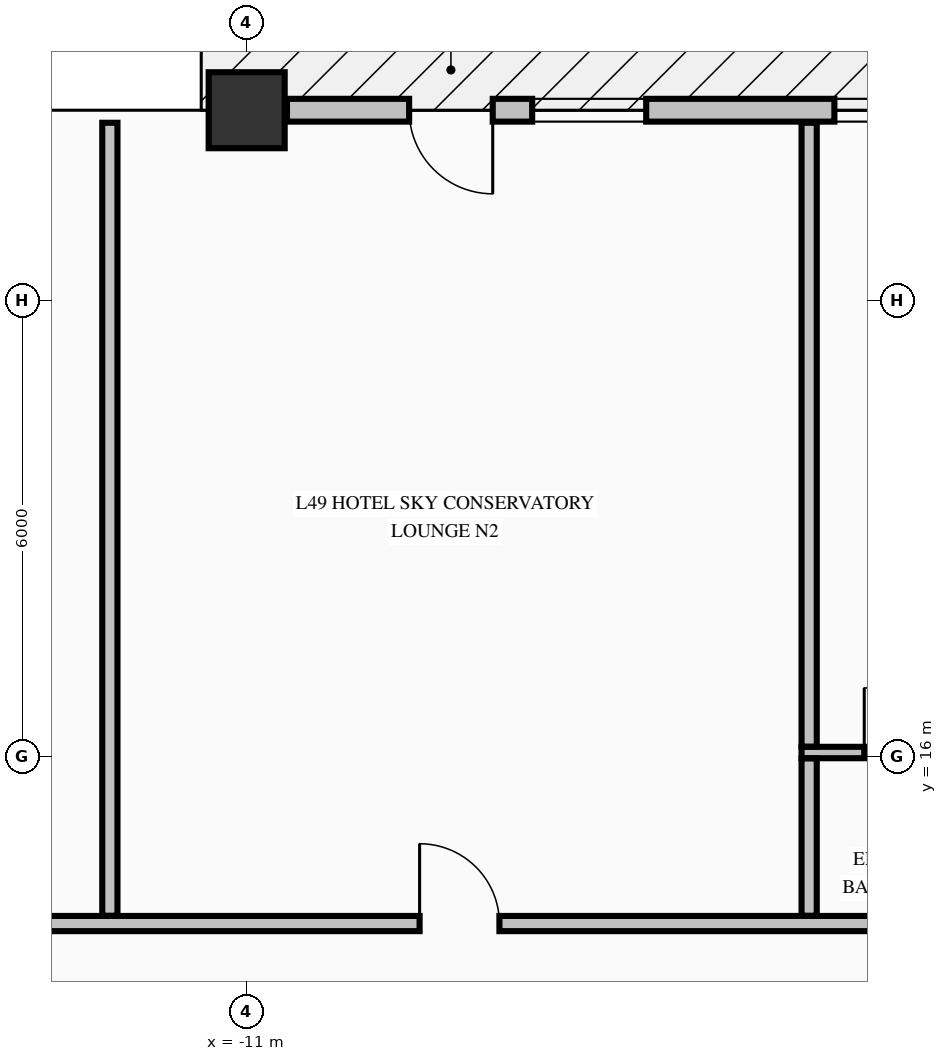
"""IFC4 building model, lengths in metres.
Left out: names, types, materials, properties, quantities, classifications, styles, units other than length and angle.
Written with IfcOpenShell. Run it as: python <this file> out.ifc"""

import sys

from ifc_helpers import new_model, si_unit, direction, frame, frame_2d, origin, origin_2d, place, context, subcontext, project, spatial, rectangle, extrude, element, fill, save


model = new_model("IFC4")
c1 = context("Model", 3, precision=1e-05, world=origin(), true_north=direction((0.0, 1.0)))
c2 = subcontext(c1, "Body", "Model", "MODEL_VIEW")
j1 = project(units=[si_unit("LENGTHUNIT", "METRE"), si_unit("PLANEANGLEUNIT", "RADIAN")], contexts=[c1])
p1 = place(None, origin())
s1 = spatial("IfcSite", under=j1, at=p1, CompositionType="ELEMENT")
p2 = place(p1, origin())
s2 = spatial("IfcBuilding", under=s1, at=p2, CompositionType="ELEMENT")
p3 = place(p2, frame((0.0, 0.0, 191.46)))
s3 = spatial("IfcBuildingStorey", under=s2, at=p3, CompositionType="ELEMENT", Elevation=191.46)
p4 = place(p3, frame((-11.0, 24.5, -0.425), z_axis=(0.0, 0.0, 1.0), x_axis=(1.0, 0.0, 0.0)))
e1 = element("IfcColumn", 1, at=p4, inside=s3, PredefinedType="COLUMN", context=c2, shape_type="SweptSolid", body=[
    extrude(rectangle(XDim=1.0, YDim=1.0, at=origin_2d()), origin(), (0.0, 0.0, 1.0), 3.55),
])
p5 = place(p3, frame((-0.53, 24.5, 0.0), z_axis=(0.0, 0.0, 1.0), x_axis=(-1.0, 0.0, 0.0)))
e2 = element("IfcWall", 2, at=p5, inside=s3, PredefinedType="STANDARD", context=c2, shape_type="SweptSolid", body=[
    extrude(rectangle(XDim=9.94, YDim=0.3, at=frame_2d((4.97, 0.0))), origin(), (0.0, 0.0, 1.0), 2.517),
])
p6 = place(p5, frame((7.233, 0.0, 0.0)))
e3 = element("IfcOpeningElement", 3, at=p6, cuts=e2, PredefinedType="OPENING", context=c2, shape_type="SweptSolid", body=[
    extrude(rectangle(XDim=1.1, YDim=2.15, at=frame_2d((0.55, 1.075))), frame((0.0, 0.16, 0.0), z_axis=(0.0, -1.0, 0.0), x_axis=(1.0, 0.0, 0.0)), (0.0, 0.0, 1.0), 0.32),
])
p7 = place(p5, frame((1.238, 0.0, 0.72)))
e4 = element("IfcOpeningElement", 4, at=p7, cuts=e2, PredefinedType="OPENING", context=c2, shape_type="SweptSolid", body=[
    extrude(rectangle(XDim=1.5, YDim=1.6, at=frame_2d((0.75, 0.8))), frame((0.0, 0.16, 0.0), z_axis=(0.0, -1.0, 0.0), x_axis=(1.0, 0.0, 0.0)), (0.0, 0.0, 1.0), 0.32),
])
p8 = place(p5, frame((5.214, 0.0, 0.72)))
e5 = element("IfcOpeningElement", 5, at=p8, cuts=e2, PredefinedType="OPENING", context=c2, shape_type="SweptSolid", body=[
    extrude(rectangle(XDim=1.5, YDim=1.6, at=frame_2d((0.75, 0.8))), frame((0.0, 0.16, 0.0), z_axis=(0.0, -1.0, 0.0), x_axis=(1.0, 0.0, 0.0)), (0.0, 0.0, 1.0), 0.32),
])
p9 = place(p3, frame((-22.1, 13.8, 0.0), z_axis=(0.0, 0.0, 1.0), x_axis=(1.0, 0.0, 0.0)))
e6 = element("IfcWall", 6, at=p9, inside=s3, PredefinedType="PARTITIONING", context=c2, shape_type="SweptSolid", body=[
    extrude(rectangle(XDim=39.2, YDim=0.2, at=frame_2d((19.6, 0.0))), origin(), (0.0, 0.0, 1.0), 3.125),
])
p10 = place(p9, frame((5.375, 0.0, 0.0)))
e7 = element("IfcOpeningElement", 7, at=p10, cuts=e6, PredefinedType="OPENING", context=c2, shape_type="SweptSolid", body=[
    extrude(rectangle(XDim=0.95, YDim=2.15, at=frame_2d((0.475, 1.075))), frame((0.0, 0.11, 0.0), z_axis=(0.0, -1.0, 0.0), x_axis=(1.0, 0.0, 0.0)), (0.0, 0.0, 1.0), 0.22),
])
p11 = place(p9, frame((13.375, 0.0, 0.0)))
e8 = element("IfcOpeningElement", 8, at=p11, cuts=e6, PredefinedType="OPENING", context=c2, shape_type="SweptSolid", body=[
    extrude(rectangle(XDim=1.05, YDim=2.15, at=frame_2d((0.525, 1.075))), frame((0.0, 0.11, 0.0), z_axis=(0.0, -1.0, 0.0), x_axis=(1.0, 0.0, 0.0)), (0.0, 0.0, 1.0), 0.22),
])
p12 = place(p9, frame((23.875, 0.0, 0.0)))
e9 = element("IfcOpeningElement", 9, at=p12, cuts=e6, PredefinedType="OPENING", context=c2, shape_type="SweptSolid", body=[
    extrude(rectangle(XDim=0.95, YDim=2.15, at=frame_2d((0.475, 1.075))), frame((0.0, 0.11, 0.0), z_axis=(0.0, -1.0, 0.0), x_axis=(1.0, 0.0, 0.0)), (0.0, 0.0, 1.0), 0.22),
])
p13 = place(p9, frame((34.175, 0.0, 0.0)))
e10 = element("IfcOpeningElement", 10, at=p13, cuts=e6, PredefinedType="OPENING", context=c2, shape_type="SweptSolid", body=[
    extrude(rectangle(XDim=0.95, YDim=2.15, at=frame_2d((0.475, 1.075))), frame((0.0, 0.11, 0.0), z_axis=(0.0, -1.0, 0.0), x_axis=(1.0, 0.0, 0.0)), (0.0, 0.0, 1.0), 0.22),
])
p14 = place(p3, frame((-3.7, 16.05, 0.0), z_axis=(0.0, 0.0, 1.0), x_axis=(1.0, 0.0, 0.0)))
e11 = element("IfcWall", 11, at=p14, inside=s3, PredefinedType="PARTITIONING", context=c2, shape_type="SweptSolid", body=[
    extrude(rectangle(XDim=2.475, YDim=0.15, at=frame_2d((1.237, 0.0))), origin(), (0.0, 0.0, 1.0), 3.125),
])
p15 = place(p14, frame((0.825, 0.0, 0.0)))
e12 = element("IfcOpeningElement", 12, at=p15, cuts=e11, PredefinedType="OPENING", context=c2, shape_type="SweptSolid", body=[
    extrude(rectangle(XDim=0.85, YDim=2.1, at=frame_2d((0.425, 1.05))), frame((0.0, 0.085, 0.0), z_axis=(0.0, -1.0, 0.0), x_axis=(1.0, 0.0, 0.0)), (0.0, 0.0, 1.0), 0.17),
])
p16 = place(p3, frame((-12.8, 13.903, 0.0), z_axis=(0.0, 0.0, 1.0), x_axis=(0.0, 1.0, 0.0)))
e13 = element("IfcWall", 13, at=p16, inside=s3, PredefinedType="PARTITIONING", context=c2, shape_type="SweptSolid", body=[
    extrude(rectangle(XDim=10.432, YDim=0.2, at=frame_2d((5.216, 0.0))), origin(), (0.0, 0.0, 1.0), 3.125),
])
p17 = place(p3, frame((-3.6, 13.903, 0.0), z_axis=(0.0, 0.0, 1.0), x_axis=(0.0, 1.0, 0.0)))
e14 = element("IfcWall", 14, at=p17, inside=s3, PredefinedType="PARTITIONING", context=c2, shape_type="SweptSolid", body=[
    extrude(rectangle(XDim=2.069, YDim=0.2, at=frame_2d((1.034, 0.0))), origin(), (0.0, 0.0, 1.0), 3.125),
])
p18 = place(p3, frame((-3.6, 16.128, 0.0), z_axis=(0.0, 0.0, 1.0), x_axis=(0.0, 1.0, 0.0)))
e15 = element("IfcWall", 15, at=p18, inside=s3, PredefinedType="PARTITIONING", context=c2, shape_type="SweptSolid", body=[
    extrude(rectangle(XDim=8.207, YDim=0.2, at=frame_2d((4.104, 0.0))), origin(), (0.0, 0.0, 1.0), 3.125),
])
p19 = place(p6, origin())
e16 = element("IfcDoor", 16, at=p19, inside=s3, OperationType="SINGLE_SWING_LEFT", PredefinedType="DOOR", context=c2, shape_type="SweptSolid", body=[
    extrude(rectangle(XDim=1.1, YDim=2.15, at=frame_2d((0.55, 1.075))), frame((0.0, 0.025, 0.0), z_axis=(0.0, -1.0, 0.0), x_axis=(1.0, 0.0, 0.0)), (0.0, 0.0, 1.0), 0.05),
])
fill(e3, e16)
p20 = place(p7, origin())
e17 = element("IfcWindow", 17, at=p20, inside=s3, PartitioningType="SINGLE_PANEL", PredefinedType="WINDOW", context=c2, shape_type="SweptSolid", body=[
    extrude(rectangle(XDim=1.5, YDim=1.6, at=frame_2d((0.75, 0.8))), frame((0.0, 0.03, 0.0), z_axis=(0.0, -1.0, 0.0), x_axis=(1.0, 0.0, 0.0)), (0.0, 0.0, 1.0), 0.06),
])
fill(e4, e17)
p21 = place(p8, origin())
e18 = element("IfcWindow", 18, at=p21, inside=s3, PartitioningType="SINGLE_PANEL", PredefinedType="WINDOW", context=c2, shape_type="SweptSolid", body=[
    extrude(rectangle(XDim=1.5, YDim=1.6, at=frame_2d((0.75, 0.8))), frame((0.0, 0.03, 0.0), z_axis=(0.0, -1.0, 0.0), x_axis=(1.0, 0.0, 0.0)), (0.0, 0.0, 1.0), 0.06),
])
fill(e5, e18)
p22 = place(p11, origin())
e19 = element("IfcDoor", 19, at=p22, inside=s3, OperationType="SINGLE_SWING_LEFT", PredefinedType="DOOR", context=c2, shape_type="SweptSolid", body=[
    extrude(rectangle(XDim=1.05, YDim=2.15, at=frame_2d((0.525, 1.075))), frame((0.0, 0.025, 0.0), z_axis=(0.0, -1.0, 0.0), x_axis=(1.0, 0.0, 0.0)), (0.0, 0.0, 1.0), 0.05),
])
fill(e8, e19)
p23 = place(p15, origin())
e20 = element("IfcDoor", 20, at=p23, inside=s3, OperationType="SINGLE_SWING_LEFT", PredefinedType="DOOR", context=c2, shape_type="SweptSolid", body=[
    extrude(rectangle(XDim=0.85, YDim=2.1, at=frame_2d((0.425, 1.05))), frame((0.0, 0.025, 0.0), z_axis=(0.0, -1.0, 0.0), x_axis=(1.0, 0.0, 0.0)), (0.0, 0.0, 1.0), 0.05),
])
fill(e12, e20)
save(model, sys.argv[1])
